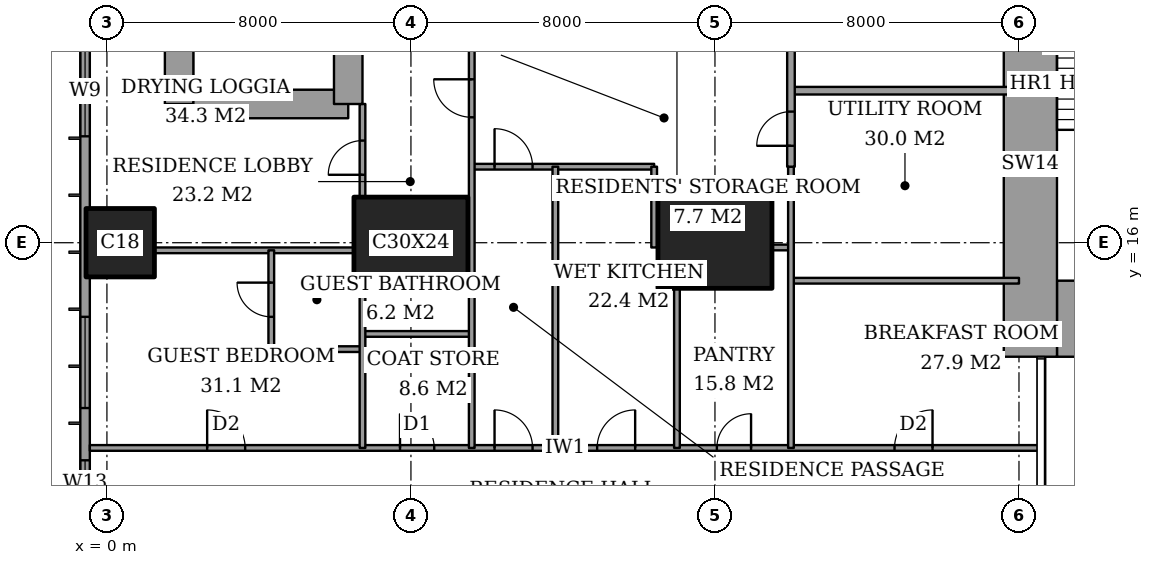
"""IFC4 building model, lengths in metres.
Left out: names, types, materials, properties, quantities, classifications, styles, units other than length and angle.
Written with IfcOpenShell. Run it as: python <this file> out.ifc"""

import sys

from ifc_helpers import new_model, si_unit, direction, frame, frame_2d, origin, origin_2d, place, context, subcontext, project, spatial, rectangle, extrude, element, fill, save


model = new_model("IFC4")
c1 = context("Model", 3, precision=1e-05, world=origin(), true_north=direction((0.0, 1.0)))
c2 = subcontext(c1, "Body", "Model", "MODEL_VIEW")
j1 = project(units=[si_unit("LENGTHUNIT", "METRE"), si_unit("PLANEANGLEUNIT", "RADIAN")], contexts=[c1])
p1 = place(None, origin())
s1 = spatial("IfcSite", under=j1, at=p1, CompositionType="ELEMENT")
p2 = place(p1, origin())
s2 = spatial("IfcBuilding", under=s1, at=p2, CompositionType="ELEMENT")
p3 = place(p2, frame((0.0, 0.0, 189.4)))
s3 = spatial("IfcBuildingStorey", under=s2, at=p3, CompositionType="ELEMENT", Elevation=189.4)
p4 = place(p3, frame((0.35, 16.0, 0.0), z_axis=(0.0, 0.0, 1.0), x_axis=(1.0, 0.0, 0.0)))
e1 = element("IfcColumn", 1, at=p4, inside=s3, PredefinedType="COLUMN", context=c2, shape_type="SweptSolid", body=[
    extrude(rectangle(XDim=1.8, YDim=1.8, at=origin_2d()), origin(), (0.0, 0.0, 1.0), 3.6),
])
for number, where, z_axis, x_axis in (
    (2, (8.0, 16.0, 0.0), (0.0, 0.0, 1.0), (1.0, 0.0, 0.0)),
    (3, (16.0, 16.0, 0.0), (0.0, 0.0, 1.0), (1.0, 0.0, 0.0)),
):
    element("IfcColumn", number, at=place(p3, frame(where, z_axis=z_axis, x_axis=x_axis)), inside=s3, PredefinedType="COLUMN", context=c2, shape_type="SweptSolid", body=[
        extrude(rectangle(XDim=3.0, YDim=2.4, at=origin_2d()), origin(), (0.0, 0.0, 1.0), 3.6),
    ])
p5 = place(p3, frame((25.0, 14.0, 0.0), z_axis=(0.0, 0.0, 1.0), x_axis=(1.0, 0.0, 0.0)))
e4 = element("IfcWall", 4, at=p5, inside=s3, PredefinedType="SHEAR", context=c2, shape_type="SweptSolid", body=[
    extrude(rectangle(XDim=3.15, YDim=2.0, at=frame_2d((1.575, 0.0))), origin(), (0.0, 0.0, 1.0), 3.6),
])
p6 = place(p3, frame((24.3, 13.0, 0.0), z_axis=(0.0, 0.0, 1.0), x_axis=(0.0, 1.0, 0.0)))
e5 = element("IfcWall", 5, at=p6, inside=s3, PredefinedType="SHEAR", context=c2, shape_type="SweptSolid", body=[
    extrude(rectangle(XDim=10.15, YDim=1.4, at=frame_2d((5.075, 0.0))), origin(), (0.0, 0.0, 1.0), 3.6),
])
p7 = place(p3, frame((1.9, 19.65, 0.0), z_axis=(0.0, 0.0, 1.0), x_axis=(1.0, 0.0, 0.0)))
e6 = element("IfcWall", 6, at=p7, inside=s3, PredefinedType="SHEAR", context=c2, shape_type="SweptSolid", body=[
    extrude(rectangle(XDim=4.45, YDim=0.75, at=frame_2d((2.225, 0.0))), origin(), (0.0, 0.0, 1.0), 3.6),
])
p8 = place(p3, frame((6.35, 19.65, 0.0), z_axis=(0.0, 0.0, 1.0), x_axis=(0.0, 1.0, 0.0)))
e7 = element("IfcWall", 7, at=p8, inside=s3, PredefinedType="SHEAR", context=c2, shape_type="SweptSolid", body=[
    extrude(rectangle(XDim=8.7, YDim=0.75, at=frame_2d((4.35, 0.0))), origin(), (0.0, 0.0, 1.0), 3.6),
])
p9 = place(p8, frame((6.725, 0.0, 0.0)))
e8 = element("IfcOpeningElement", 8, at=p9, cuts=e7, PredefinedType="OPENING", context=c2, shape_type="SweptSolid", body=[
    extrude(rectangle(XDim=1.0, YDim=2.1, at=frame_2d((0.5, 1.05))), frame((0.0, 0.385, 0.0), z_axis=(0.0, -1.0, 0.0), x_axis=(1.0, 0.0, 0.0)), (0.0, 0.0, 1.0), 0.77),
])
p10 = place(p3, frame((1.9, 28.35, 0.0), z_axis=(0.0, 0.0, 1.0), x_axis=(0.0, -1.0, 0.0)))
e9 = element("IfcWall", 9, at=p10, inside=s3, PredefinedType="SHEAR", context=c2, shape_type="SweptSolid", body=[
    extrude(rectangle(XDim=8.7, YDim=0.75, at=frame_2d((4.35, 0.0))), origin(), (0.0, 0.0, 1.0), 3.6),
])
p11 = place(p3, frame((-0.575, 44.825, 0.0), z_axis=(0.0, 0.0, 1.0), x_axis=(0.0, -1.0, 0.0)))
e10 = element("IfcWall", 10, at=p11, inside=s3, PredefinedType="SOLIDWALL", context=c2, shape_type="SweptSolid", body=[
    extrude(rectangle(XDim=41.65, YDim=0.25, at=frame_2d((20.825, 0.0))), origin(), (0.0, 0.0, 1.0), 3.6),
])
p12 = place(p11, frame((0.825, 0.0, 0.2)))
e11 = element("IfcOpeningElement", 11, at=p12, cuts=e10, PredefinedType="OPENING", context=c2, shape_type="SweptSolid", body=[
    extrude(rectangle(XDim=2.4, YDim=2.4, at=frame_2d((1.2, 1.2))), frame((0.0, 0.135, 0.0), z_axis=(0.0, -1.0, 0.0), x_axis=(1.0, 0.0, 0.0)), (0.0, 0.0, 1.0), 0.27),
])
p13 = place(p11, frame((6.05, 0.0, 0.2)))
e12 = element("IfcOpeningElement", 12, at=p13, cuts=e10, PredefinedType="OPENING", context=c2, shape_type="SweptSolid", body=[
    extrude(rectangle(XDim=1.2, YDim=2.4, at=frame_2d((0.6, 1.2))), frame((0.0, 0.135, 0.0), z_axis=(0.0, -1.0, 0.0), x_axis=(1.0, 0.0, 0.0)), (0.0, 0.0, 1.0), 0.27),
])
p14 = place(p11, frame((8.475, 0.0, 0.2)))
e13 = element("IfcOpeningElement", 13, at=p14, cuts=e10, PredefinedType="OPENING", context=c2, shape_type="SweptSolid", body=[
    extrude(rectangle(XDim=2.4, YDim=2.4, at=frame_2d((1.2, 1.2))), frame((0.0, 0.135, 0.0), z_axis=(0.0, -1.0, 0.0), x_axis=(1.0, 0.0, 0.0)), (0.0, 0.0, 1.0), 0.27),
])
p15 = place(p11, frame((15.625, 0.0, 0.2)))
e14 = element("IfcOpeningElement", 14, at=p15, cuts=e10, PredefinedType="OPENING", context=c2, shape_type="SweptSolid", body=[
    extrude(rectangle(XDim=2.4, YDim=2.4, at=frame_2d((1.2, 1.2))), frame((0.0, 0.135, 0.0), z_axis=(0.0, -1.0, 0.0), x_axis=(1.0, 0.0, 0.0)), (0.0, 0.0, 1.0), 0.27),
])
p16 = place(p11, frame((23.625, 0.0, 0.2)))
e15 = element("IfcOpeningElement", 15, at=p16, cuts=e10, PredefinedType="OPENING", context=c2, shape_type="SweptSolid", body=[
    extrude(rectangle(XDim=2.4, YDim=2.4, at=frame_2d((1.2, 1.2))), frame((0.0, 0.135, 0.0), z_axis=(0.0, -1.0, 0.0), x_axis=(1.0, 0.0, 0.0)), (0.0, 0.0, 1.0), 0.27),
])
p17 = place(p11, frame((30.775, 0.0, 0.2)))
e16 = element("IfcOpeningElement", 16, at=p17, cuts=e10, PredefinedType="OPENING", context=c2, shape_type="SweptSolid", body=[
    extrude(rectangle(XDim=2.4, YDim=2.4, at=frame_2d((1.2, 1.2))), frame((0.0, 0.135, 0.0), z_axis=(0.0, -1.0, 0.0), x_axis=(1.0, 0.0, 0.0)), (0.0, 0.0, 1.0), 0.27),
])
p18 = place(p11, frame((34.55, 0.0, 0.2)))
e17 = element("IfcOpeningElement", 17, at=p18, cuts=e10, PredefinedType="OPENING", context=c2, shape_type="SweptSolid", body=[
    extrude(rectangle(XDim=1.2, YDim=2.4, at=frame_2d((0.6, 1.2))), frame((0.0, 0.135, 0.0), z_axis=(0.0, -1.0, 0.0), x_axis=(1.0, 0.0, 0.0)), (0.0, 0.0, 1.0), 0.27),
])
p19 = place(p11, frame((38.425, 0.0, 0.2)))
e18 = element("IfcOpeningElement", 18, at=p19, cuts=e10, PredefinedType="OPENING", context=c2, shape_type="SweptSolid", body=[
    extrude(rectangle(XDim=2.4, YDim=2.4, at=frame_2d((1.2, 1.2))), frame((0.0, 0.135, 0.0), z_axis=(0.0, -1.0, 0.0), x_axis=(1.0, 0.0, 0.0)), (0.0, 0.0, 1.0), 0.27),
])
p20 = place(p3, frame((-0.45, 10.6, 0.0), z_axis=(0.0, 0.0, 1.0), x_axis=(1.0, 0.0, 0.0)))
e19 = element("IfcWall", 19, at=p20, inside=s3, PredefinedType="PARTITIONING", context=c2, shape_type="SweptSolid", body=[
    extrude(rectangle(XDim=25.011, YDim=0.15, at=frame_2d((12.505, 0.0))), origin(), (0.0, 0.0, 1.0), 3.35),
])
p21 = place(p20, frame((10.65, 0.0, 0.0)))
e20 = element("IfcOpeningElement", 20, at=p21, cuts=e19, PredefinedType="OPENING", context=c2, shape_type="SweptSolid", body=[
    extrude(rectangle(XDim=1.0, YDim=2.1, at=frame_2d((0.5, 1.05))), frame((0.0, 0.085, 0.0), z_axis=(0.0, -1.0, 0.0), x_axis=(1.0, 0.0, 0.0)), (0.0, 0.0, 1.0), 0.17),
])
p22 = place(p20, frame((3.087, 0.0, 0.0)))
e21 = element("IfcOpeningElement", 21, at=p22, cuts=e19, PredefinedType="OPENING", context=c2, shape_type="SweptSolid", body=[
    extrude(rectangle(XDim=1.0, YDim=2.1, at=frame_2d((0.5, 1.05))), frame((0.0, 0.085, 0.0), z_axis=(0.0, -1.0, 0.0), x_axis=(1.0, 0.0, 0.0)), (0.0, 0.0, 1.0), 0.17),
])
p23 = place(p20, frame((8.163, 0.0, 0.0)))
e22 = element("IfcOpeningElement", 22, at=p23, cuts=e19, PredefinedType="OPENING", context=c2, shape_type="SweptSolid", body=[
    extrude(rectangle(XDim=0.9, YDim=2.1, at=frame_2d((0.45, 1.05))), frame((0.0, 0.085, 0.0), z_axis=(0.0, -1.0, 0.0), x_axis=(1.0, 0.0, 0.0)), (0.0, 0.0, 1.0), 0.17),
])
p24 = place(p20, frame((13.35, 0.0, 0.0)))
e23 = element("IfcOpeningElement", 23, at=p24, cuts=e19, PredefinedType="OPENING", context=c2, shape_type="SweptSolid", body=[
    extrude(rectangle(XDim=1.0, YDim=2.1, at=frame_2d((0.5, 1.05))), frame((0.0, 0.085, 0.0), z_axis=(0.0, -1.0, 0.0), x_axis=(1.0, 0.0, 0.0)), (0.0, 0.0, 1.0), 0.17),
])
p25 = place(p20, frame((16.5, 0.0, 0.0)))
e24 = element("IfcOpeningElement", 24, at=p25, cuts=e19, PredefinedType="OPENING", context=c2, shape_type="SweptSolid", body=[
    extrude(rectangle(XDim=0.9, YDim=2.1, at=frame_2d((0.45, 1.05))), frame((0.0, 0.085, 0.0), z_axis=(0.0, -1.0, 0.0), x_axis=(1.0, 0.0, 0.0)), (0.0, 0.0, 1.0), 0.17),
])
p26 = place(p20, frame((21.175, 0.0, 0.0)))
e25 = element("IfcOpeningElement", 25, at=p26, cuts=e19, PredefinedType="OPENING", context=c2, shape_type="SweptSolid", body=[
    extrude(rectangle(XDim=1.0, YDim=2.1, at=frame_2d((0.5, 1.05))), frame((0.0, 0.085, 0.0), z_axis=(0.0, -1.0, 0.0), x_axis=(1.0, 0.0, 0.0)), (0.0, 0.0, 1.0), 0.17),
])
p27 = place(p3, frame((4.325, 13.2, 0.0), z_axis=(0.0, 0.0, 1.0), x_axis=(1.0, 0.0, 0.0)))
e26 = element("IfcWall", 26, at=p27, inside=s3, PredefinedType="PARTITIONING", context=c2, shape_type="SweptSolid", body=[
    extrude(rectangle(XDim=2.4, YDim=0.15, at=frame_2d((1.2, 0.0))), origin(), (0.0, 0.0, 1.0), 3.35),
])
p28 = place(p3, frame((6.725, 13.6, 0.0), z_axis=(0.0, 0.0, 1.0), x_axis=(1.0, 0.0, 0.0)))
e27 = element("IfcWall", 27, at=p28, inside=s3, PredefinedType="PARTITIONING", context=c2, shape_type="SweptSolid", body=[
    extrude(rectangle(XDim=2.875, YDim=0.15, at=frame_2d((1.438, 0.0))), origin(), (0.0, 0.0, 1.0), 3.35),
])
p29 = place(p3, frame((18.0, 15.0, 0.0), z_axis=(0.0, 0.0, 1.0), x_axis=(1.0, 0.0, 0.0)))
e28 = element("IfcWall", 28, at=p29, inside=s3, PredefinedType="PARTITIONING", context=c2, shape_type="SweptSolid", body=[
    extrude(rectangle(XDim=6.0, YDim=0.15, at=frame_2d((3.0, 0.0))), origin(), (0.0, 0.0, 1.0), 3.35),
])
p30 = place(p3, frame((1.25, 15.8, 0.0), z_axis=(0.0, 0.0, 1.0), x_axis=(1.0, 0.0, 0.0)))
e29 = element("IfcWall", 29, at=p30, inside=s3, PredefinedType="PARTITIONING", context=c2, shape_type="SweptSolid", body=[
    extrude(rectangle(XDim=5.25, YDim=0.15, at=frame_2d((2.625, 0.0))), origin(), (0.0, 0.0, 1.0), 3.35),
])
p31 = place(p3, frame((17.5, 15.875, 0.0), z_axis=(0.0, 0.0, 1.0), x_axis=(1.0, 0.0, 0.0)))
e30 = element("IfcWall", 30, at=p31, inside=s3, PredefinedType="PARTITIONING", context=c2, shape_type="SweptSolid", body=[
    extrude(rectangle(XDim=0.5, YDim=0.15, at=frame_2d((0.25, 0.0))), origin(), (0.0, 0.0, 1.0), 2.634),
])
p32 = place(p3, frame((9.6, 18.0, 0.0), z_axis=(0.0, 0.0, 1.0), x_axis=(1.0, 0.0, 0.0)))
e31 = element("IfcWall", 31, at=p32, inside=s3, PredefinedType="PARTITIONING", context=c2, shape_type="SweptSolid", body=[
    extrude(rectangle(XDim=4.8, YDim=0.15, at=frame_2d((2.4, 0.0))), origin(), (0.0, 0.0, 1.0), 3.35),
])
p33 = place(p32, frame((0.6, 0.0, 0.0)))
e32 = element("IfcOpeningElement", 32, at=p33, cuts=e31, PredefinedType="OPENING", context=c2, shape_type="SweptSolid", body=[
    extrude(rectangle(XDim=1.0, YDim=2.1, at=frame_2d((0.5, 1.05))), frame((0.0, 0.085, 0.0), z_axis=(0.0, -1.0, 0.0), x_axis=(1.0, 0.0, 0.0)), (0.0, 0.0, 1.0), 0.17),
])
p34 = place(p3, frame((18.0, 20.0, 0.0), z_axis=(0.0, 0.0, 1.0), x_axis=(1.0, 0.0, 0.0)))
e33 = element("IfcWall", 33, at=p34, inside=s3, PredefinedType="PARTITIONING", context=c2, shape_type="SweptSolid", body=[
    extrude(rectangle(XDim=6.0, YDim=0.2, at=frame_2d((3.0, 0.0))), origin(), (0.0, 0.0, 1.0), 3.35),
])
p35 = place(p3, frame((4.325, 13.2, 0.0), z_axis=(0.0, 0.0, 1.0), x_axis=(0.0, 1.0, 0.0)))
e34 = element("IfcWall", 34, at=p35, inside=s3, PredefinedType="PARTITIONING", context=c2, shape_type="SweptSolid", body=[
    extrude(rectangle(XDim=2.6, YDim=0.15, at=frame_2d((1.3, 0.0))), origin(), (0.0, 0.0, 1.0), 3.35),
])
p36 = place(p35, frame((0.85, 0.0, 0.0)))
e35 = element("IfcOpeningElement", 35, at=p36, cuts=e34, PredefinedType="OPENING", context=c2, shape_type="SweptSolid", body=[
    extrude(rectangle(XDim=0.9, YDim=2.1, at=frame_2d((0.45, 1.05))), frame((0.0, 0.085, 0.0), z_axis=(0.0, -1.0, 0.0), x_axis=(1.0, 0.0, 0.0)), (0.0, 0.0, 1.0), 0.17),
])
p37 = place(p3, frame((6.725, 10.6, 0.0), z_axis=(0.0, 0.0, 1.0), x_axis=(0.0, 1.0, 0.0)))
e36 = element("IfcWall", 36, at=p37, inside=s3, PredefinedType="PARTITIONING", context=c2, shape_type="SweptSolid", body=[
    extrude(rectangle(XDim=4.2, YDim=0.15, at=frame_2d((2.1, 0.0))), origin(), (0.0, 0.0, 1.0), 3.35),
])
p38 = place(p3, frame((6.725, 17.2, 0.0), z_axis=(0.0, 0.0, 1.0), x_axis=(0.0, 1.0, 0.0)))
e37 = element("IfcWall", 37, at=p38, inside=s3, PredefinedType="PARTITIONING", context=c2, shape_type="SweptSolid", body=[
    extrude(rectangle(XDim=2.45, YDim=0.15, at=frame_2d((1.225, 0.0))), origin(), (0.0, 0.0, 1.0), 3.35),
])
p39 = place(p38, frame((0.587, 0.0, 0.0)))
e38 = element("IfcOpeningElement", 38, at=p39, cuts=e37, PredefinedType="OPENING", context=c2, shape_type="SweptSolid", body=[
    extrude(rectangle(XDim=0.9, YDim=2.1, at=frame_2d((0.45, 1.05))), frame((0.0, 0.085, 0.0), z_axis=(0.0, -1.0, 0.0), x_axis=(1.0, 0.0, 0.0)), (0.0, 0.0, 1.0), 0.17),
])
p40 = place(p3, frame((9.6, 10.6, 0.0), z_axis=(0.0, 0.0, 1.0), x_axis=(0.0, 1.0, 0.0)))
e39 = element("IfcWall", 39, at=p40, inside=s3, PredefinedType="PARTITIONING", context=c2, shape_type="SweptSolid", body=[
    extrude(rectangle(XDim=11.0, YDim=0.15, at=frame_2d((5.5, 0.0))), origin(), (0.0, 0.0, 1.0), 3.35),
])
p41 = place(p40, frame((8.7, 0.0, 0.0)))
e40 = element("IfcOpeningElement", 40, at=p41, cuts=e39, PredefinedType="OPENING", context=c2, shape_type="SweptSolid", body=[
    extrude(rectangle(XDim=1.0, YDim=2.1, at=frame_2d((0.5, 1.05))), frame((0.0, 0.085, 0.0), z_axis=(0.0, -1.0, 0.0), x_axis=(1.0, 0.0, 0.0)), (0.0, 0.0, 1.0), 0.17),
])
p42 = place(p3, frame((11.8, 10.6, 0.0), z_axis=(0.0, 0.0, 1.0), x_axis=(0.0, 1.0, 0.0)))
e41 = element("IfcWall", 41, at=p42, inside=s3, PredefinedType="PARTITIONING", context=c2, shape_type="SweptSolid", body=[
    extrude(rectangle(XDim=7.4, YDim=0.15, at=frame_2d((3.7, 0.0))), origin(), (0.0, 0.0, 1.0), 3.35),
])
p43 = place(p3, frame((14.4, 15.875, 0.0), z_axis=(0.0, 0.0, 1.0), x_axis=(0.0, 1.0, 0.0)))
e42 = element("IfcWall", 42, at=p43, inside=s3, PredefinedType="PARTITIONING", context=c2, shape_type="SweptSolid", body=[
    extrude(rectangle(XDim=2.125, YDim=0.15, at=frame_2d((1.062, 0.0))), origin(), (0.0, 0.0, 1.0), 3.35),
])
p44 = place(p3, frame((15.0, 10.6, 0.0), z_axis=(0.0, 0.0, 1.0), x_axis=(0.0, 1.0, 0.0)))
e43 = element("IfcWall", 43, at=p44, inside=s3, PredefinedType="PARTITIONING", context=c2, shape_type="SweptSolid", body=[
    extrude(rectangle(XDim=4.2, YDim=0.15, at=frame_2d((2.1, 0.0))), origin(), (0.0, 0.0, 1.0), 3.35),
])
p45 = place(p3, frame((18.0, 18.0, 0.0), z_axis=(0.0, 0.0, 1.0), x_axis=(0.0, 1.0, 0.0)))
e44 = element("IfcWall", 44, at=p45, inside=s3, PredefinedType="PARTITIONING", context=c2, shape_type="SweptSolid", body=[
    extrude(rectangle(XDim=6.0, YDim=0.2, at=frame_2d((3.0, 0.0))), origin(), (0.0, 0.0, 1.0), 3.35),
])
p46 = place(p45, frame((3.4, 0.0, 0.0)))
e45 = element("IfcOpeningElement", 45, at=p46, cuts=e44, PredefinedType="OPENING", context=c2, shape_type="SweptSolid", body=[
    extrude(rectangle(XDim=1.2, YDim=2.4, at=frame_2d((0.6, 1.2))), frame((0.0, 0.11, 0.0), z_axis=(0.0, -1.0, 0.0), x_axis=(1.0, 0.0, 0.0)), (0.0, 0.0, 1.0), 0.22),
])
p47 = place(p45, frame((0.55, 0.0, 0.0)))
e46 = element("IfcOpeningElement", 46, at=p47, cuts=e44, PredefinedType="OPENING", context=c2, shape_type="SweptSolid", body=[
    extrude(rectangle(XDim=0.9, YDim=2.1, at=frame_2d((0.45, 1.05))), frame((0.0, 0.11, 0.0), z_axis=(0.0, -1.0, 0.0), x_axis=(1.0, 0.0, 0.0)), (0.0, 0.0, 1.0), 0.22),
])
p48 = place(p3, frame((18.0, 10.6, 0.0), z_axis=(0.0, 0.0, 1.0), x_axis=(0.0, 1.0, 0.0)))
e47 = element("IfcWall", 47, at=p48, inside=s3, PredefinedType="PARTITIONING", context=c2, shape_type="SweptSolid", body=[
    extrude(rectangle(XDim=7.4, YDim=0.15, at=frame_2d((3.7, 0.0))), origin(), (0.0, 0.0, 1.0), 3.35),
])
p49 = place(p16, origin())
e48 = element("IfcWindow", 48, at=p49, inside=s3, PartitioningType="SINGLE_PANEL", PredefinedType="WINDOW", context=c2, shape_type="SweptSolid", body=[
    extrude(rectangle(XDim=2.4, YDim=2.4, at=frame_2d((1.2, 1.2))), frame((0.0, 0.03, 0.0), z_axis=(0.0, -1.0, 0.0), x_axis=(1.0, 0.0, 0.0)), (0.0, 0.0, 1.0), 0.06),
])
fill(e15, e48)
p50 = place(p17, origin())
e49 = element("IfcWindow", 49, at=p50, inside=s3, PartitioningType="SINGLE_PANEL", PredefinedType="WINDOW", context=c2, shape_type="SweptSolid", body=[
    extrude(rectangle(XDim=2.4, YDim=2.4, at=frame_2d((1.2, 1.2))), frame((0.0, 0.03, 0.0), z_axis=(0.0, -1.0, 0.0), x_axis=(1.0, 0.0, 0.0)), (0.0, 0.0, 1.0), 0.06),
])
fill(e16, e49)
p51 = place(p18, origin())
e50 = element("IfcWindow", 50, at=p51, inside=s3, PartitioningType="SINGLE_PANEL", PredefinedType="WINDOW", context=c2, shape_type="SweptSolid", body=[
    extrude(rectangle(XDim=1.2, YDim=2.4, at=frame_2d((0.6, 1.2))), frame((0.0, 0.03, 0.0), z_axis=(0.0, -1.0, 0.0), x_axis=(1.0, 0.0, 0.0)), (0.0, 0.0, 1.0), 0.06),
])
fill(e17, e50)
p52 = place(p21, origin())
e51 = element("IfcDoor", 51, at=p52, inside=s3, OperationType="SINGLE_SWING_RIGHT", PredefinedType="DOOR", context=c2, shape_type="SweptSolid", body=[
    extrude(rectangle(XDim=1.0, YDim=2.1, at=frame_2d((0.5, 1.05))), frame((0.0, 0.025, 0.0), z_axis=(0.0, -1.0, 0.0), x_axis=(1.0, 0.0, 0.0)), (0.0, 0.0, 1.0), 0.05),
])
fill(e20, e51)
p53 = place(p36, origin())
e52 = element("IfcDoor", 52, at=p53, inside=s3, OperationType="SINGLE_SWING_LEFT", PredefinedType="DOOR", context=c2, shape_type="SweptSolid", body=[
    extrude(rectangle(XDim=0.9, YDim=2.1, at=frame_2d((0.45, 1.05))), frame((0.0, 0.025, 0.0), z_axis=(0.0, -1.0, 0.0), x_axis=(1.0, 0.0, 0.0)), (0.0, 0.0, 1.0), 0.05),
])
fill(e35, e52)
p54 = place(p22, origin())
e53 = element("IfcDoor", 53, at=p54, inside=s3, OperationType="SINGLE_SWING_RIGHT", PredefinedType="DOOR", context=c2, shape_type="SweptSolid", body=[
    extrude(rectangle(XDim=1.0, YDim=2.1, at=frame_2d((0.5, 1.05))), frame((0.0, 0.025, 0.0), z_axis=(0.0, -1.0, 0.0), x_axis=(1.0, 0.0, 0.0)), (0.0, 0.0, 1.0), 0.05),
])
fill(e21, e53)
p55 = place(p39, origin())
e54 = element("IfcDoor", 54, at=p55, inside=s3, OperationType="SINGLE_SWING_RIGHT", PredefinedType="DOOR", context=c2, shape_type="SweptSolid", body=[
    extrude(rectangle(XDim=0.9, YDim=2.1, at=frame_2d((0.45, 1.05))), frame((0.0, 0.025, 0.0), z_axis=(0.0, -1.0, 0.0), x_axis=(1.0, 0.0, 0.0)), (0.0, 0.0, 1.0), 0.05),
])
fill(e38, e54)
p56 = place(p23, origin())
e55 = element("IfcDoor", 55, at=p56, inside=s3, OperationType="SINGLE_SWING_RIGHT", PredefinedType="DOOR", context=c2, shape_type="SweptSolid", body=[
    extrude(rectangle(XDim=0.9, YDim=2.1, at=frame_2d((0.45, 1.05))), frame((0.0, 0.025, 0.0), z_axis=(0.0, -1.0, 0.0), x_axis=(1.0, 0.0, 0.0)), (0.0, 0.0, 1.0), 0.05),
])
fill(e22, e55)
p57 = place(p41, origin())
e56 = element("IfcDoor", 56, at=p57, inside=s3, OperationType="SINGLE_SWING_LEFT", PredefinedType="DOOR", context=c2, shape_type="SweptSolid", body=[
    extrude(rectangle(XDim=1.0, YDim=2.1, at=frame_2d((0.5, 1.05))), frame((0.0, 0.025, 0.0), z_axis=(0.0, -1.0, 0.0), x_axis=(1.0, 0.0, 0.0)), (0.0, 0.0, 1.0), 0.05),
])
fill(e40, e56)
p58 = place(p33, origin())
e57 = element("IfcDoor", 57, at=p58, inside=s3, OperationType="SINGLE_SWING_RIGHT", PredefinedType="DOOR", context=c2, shape_type="SweptSolid", body=[
    extrude(rectangle(XDim=1.0, YDim=2.1, at=frame_2d((0.5, 1.05))), frame((0.0, 0.025, 0.0), z_axis=(0.0, -1.0, 0.0), x_axis=(1.0, 0.0, 0.0)), (0.0, 0.0, 1.0), 0.05),
])
fill(e32, e57)
p59 = place(p24, origin())
e58 = element("IfcDoor", 58, at=p59, inside=s3, OperationType="SINGLE_SWING_LEFT", PredefinedType="DOOR", context=c2, shape_type="SweptSolid", body=[
    extrude(rectangle(XDim=1.0, YDim=2.1, at=frame_2d((0.5, 1.05))), frame((0.0, 0.025, 0.0), z_axis=(0.0, -1.0, 0.0), x_axis=(1.0, 0.0, 0.0)), (0.0, 0.0, 1.0), 0.05),
])
fill(e23, e58)
p60 = place(p25, origin())
e59 = element("IfcDoor", 59, at=p60, inside=s3, OperationType="SINGLE_SWING_LEFT", PredefinedType="DOOR", context=c2, shape_type="SweptSolid", body=[
    extrude(rectangle(XDim=0.9, YDim=2.1, at=frame_2d((0.45, 1.05))), frame((0.0, 0.025, 0.0), z_axis=(0.0, -1.0, 0.0), x_axis=(1.0, 0.0, 0.0)), (0.0, 0.0, 1.0), 0.05),
])
fill(e24, e59)
p61 = place(p26, origin())
e60 = element("IfcDoor", 60, at=p61, inside=s3, OperationType="SINGLE_SWING_LEFT", PredefinedType="DOOR", context=c2, shape_type="SweptSolid", body=[
    extrude(rectangle(XDim=1.0, YDim=2.1, at=frame_2d((0.5, 1.05))), frame((0.0, 0.025, 0.0), z_axis=(0.0, -1.0, 0.0), x_axis=(1.0, 0.0, 0.0)), (0.0, 0.0, 1.0), 0.05),
])
fill(e25, e60)
p62 = place(p47, origin())
e61 = element("IfcDoor", 61, at=p62, inside=s3, OperationType="SINGLE_SWING_RIGHT", PredefinedType="DOOR", context=c2, shape_type="SweptSolid", body=[
    extrude(rectangle(XDim=0.9, YDim=2.1, at=frame_2d((0.45, 1.05))), frame((0.0, 0.025, 0.0), z_axis=(0.0, -1.0, 0.0), x_axis=(1.0, 0.0, 0.0)), (0.0, 0.0, 1.0), 0.05),
])
fill(e46, e61)
save(model, sys.argv[1])
